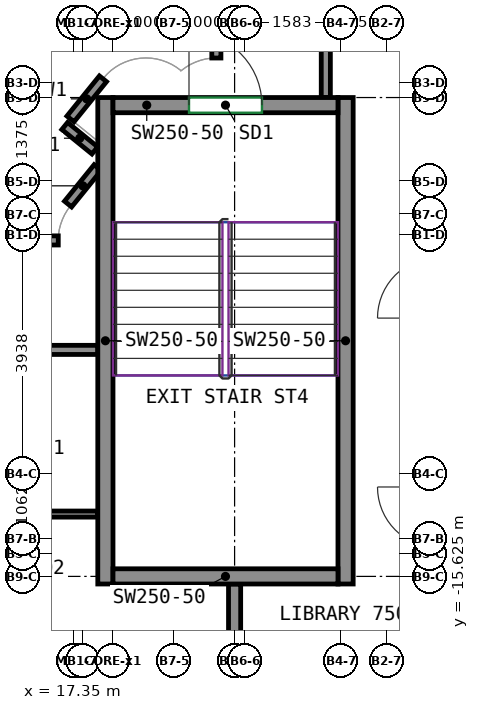
"""IFC4 building model, lengths in metres.
Left out: names, types, materials, properties, quantities, classifications, styles, units other than length and angle.
Written with IfcOpenShell. Run it as: python <this file> out.ifc"""

import sys

from ifc_helpers import new_model, si_unit, direction, frame, frame_2d, origin, place, context, subcontext, project, spatial, rectangle, extrude, source, transform, mapped, element, fill, save


model = new_model("IFC4")
c1 = context("Model", 3, precision=1e-05, world=origin(), true_north=direction((0.0, 1.0)))
c2 = subcontext(c1, "Body", "Model", "MODEL_VIEW")
j1 = project(units=[si_unit("LENGTHUNIT", "METRE"), si_unit("PLANEANGLEUNIT", "RADIAN")], contexts=[c1])
p1 = place(None, origin())
s1 = spatial("IfcSite", under=j1, at=p1, CompositionType="ELEMENT")
p2 = place(p1, origin())
s2 = spatial("IfcBuilding", under=s1, at=p2, CompositionType="ELEMENT")
p3 = place(p2, frame((0.0, 0.0, 301.8)))
s3 = spatial("IfcBuildingStorey", under=s2, at=p3, CompositionType="ELEMENT", Elevation=301.8)
m1 = source(origin(), c2, "Body", "SweptSolid", [
    extrude(rectangle(XDim=8.0, YDim=0.25, at=frame_2d((4.0, 0.0))), origin(), (0.0, 0.0, 1.0), 3.12),
])
for number, where, z_axis, x_axis in (
    (1, (17.875, -15.75, 0.0), (0.0, 0.0, 1.0), (0.0, 1.0, 0.0)),
    (2, (21.825, -15.75, 0.0), (0.0, 0.0, 1.0), (0.0, 1.0, 0.0)),
):
    element("IfcWall", number, at=place(p3, frame(where, z_axis=z_axis, x_axis=x_axis)), inside=s3, PredefinedType="SHEAR", context=c2, shape_type="MappedRepresentation", body=[
        mapped(m1, transform((0.0, 0.0, 0.0))),
    ])
m2 = source(origin(), c2, "Body", "SweptSolid", [
    extrude(rectangle(XDim=3.7, YDim=0.25, at=frame_2d((1.85, 0.0))), origin(), (0.0, 0.0, 1.0), 3.12),
])
p4 = place(p3, frame((18.0, -15.625, 0.0), z_axis=(0.0, 0.0, 1.0), x_axis=(1.0, 0.0, 0.0)))
e3 = element("IfcWall", 3, at=p4, inside=s3, PredefinedType="SHEAR", context=c2, shape_type="MappedRepresentation", body=[
    mapped(m2, transform((0.0, 0.0, 0.0))),
])
p5 = place(p3, frame((18.0, -7.875, 0.0), z_axis=(0.0, 0.0, 1.0), x_axis=(1.0, 0.0, 0.0)))
e4 = element("IfcWall", 4, at=p5, inside=s3, PredefinedType="SHEAR", context=c2, shape_type="MappedRepresentation", body=[
    mapped(m2, transform((0.0, 0.0, 0.0))),
])
p6 = place(p5, frame((1.25, 0.0, 0.0)))
e5 = element("IfcOpeningElement", 5, at=p6, cuts=e4, PredefinedType="OPENING", context=c2, shape_type="SweptSolid", body=[
    extrude(rectangle(XDim=1.2, YDim=2.1, at=frame_2d((0.6, 1.05))), frame((0.0, 0.135, 0.0), z_axis=(0.0, -1.0, 0.0), x_axis=(1.0, 0.0, 0.0)), (0.0, 0.0, 1.0), 0.27),
])
p7 = place(p3, frame((-13.55, -11.9, 0.0), z_axis=(0.0, 0.0, 1.0), x_axis=(1.0, 0.0, 0.0)))
e6 = element("IfcWall", 6, at=p7, inside=s3, PredefinedType="PARTITIONING", context=c2, shape_type="SweptSolid", body=[
    extrude(rectangle(XDim=31.3, YDim=0.15, at=frame_2d((15.65, 0.0))), origin(), (0.0, 0.0, 1.0), 3.12),
])
p8 = place(p7, frame((3.747, 0.0, 0.0)))
e7 = element("IfcOpeningElement", 7, at=p8, cuts=e6, PredefinedType="OPENING", context=c2, shape_type="SweptSolid", body=[
    extrude(rectangle(XDim=1.0, YDim=2.1, at=frame_2d((0.5, 1.05))), frame((0.0, 0.085, 0.0), z_axis=(0.0, -1.0, 0.0), x_axis=(1.0, 0.0, 0.0)), (0.0, 0.0, 1.0), 0.17),
])
p9 = place(p7, frame((22.835, 0.0, 0.0)))
e8 = element("IfcOpeningElement", 8, at=p9, cuts=e6, PredefinedType="OPENING", context=c2, shape_type="SweptSolid", body=[
    extrude(rectangle(XDim=1.0, YDim=2.1, at=frame_2d((0.5, 1.05))), frame((0.0, 0.085, 0.0), z_axis=(0.0, -1.0, 0.0), x_axis=(1.0, 0.0, 0.0)), (0.0, 0.0, 1.0), 0.17),
])
p10 = place(p3, frame((21.5, -7.75, 0.0), z_axis=(0.0, 0.0, 1.0), x_axis=(0.0, 1.0, 0.0)))
e9 = element("IfcWall", 9, at=p10, inside=s3, PredefinedType="PARTITIONING", context=c2, shape_type="SweptSolid", body=[
    extrude(rectangle(XDim=30.575, YDim=0.15, at=frame_2d((15.288, 0.0))), origin(), (0.0, 0.0, 1.0), 3.12),
])
p11 = place(p10, frame((14.035, 0.0, 0.0)))
e10 = element("IfcOpeningElement", 10, at=p11, cuts=e9, PredefinedType="OPENING", context=c2, shape_type="SweptSolid", body=[
    extrude(rectangle(XDim=0.9, YDim=2.1, at=frame_2d((0.45, 1.05))), frame((0.0, 0.085, 0.0), z_axis=(0.0, -1.0, 0.0), x_axis=(1.0, 0.0, 0.0)), (0.0, 0.0, 1.0), 0.17),
])
p12 = place(p3, frame((-13.55, -10.1, 0.0), z_axis=(0.0, 0.0, 1.0), x_axis=(1.0, 0.0, 0.0)))
e11 = element("IfcWall", 11, at=p12, inside=s3, PredefinedType="PARTITIONING", context=c2, shape_type="SweptSolid", body=[
    extrude(rectangle(XDim=30.65, YDim=0.15, at=frame_2d((15.325, 0.0))), origin(), (0.0, 0.0, 1.0), 3.12),
])
p13 = place(p12, frame((10.25, 0.0, 0.0)))
e12 = element("IfcOpeningElement", 12, at=p13, cuts=e11, PredefinedType="OPENING", context=c2, shape_type="SweptSolid", body=[
    extrude(rectangle(XDim=0.9, YDim=2.1, at=frame_2d((0.45, 1.05))), frame((0.0, 0.085, 0.0), z_axis=(0.0, -1.0, 0.0), x_axis=(1.0, 0.0, 0.0)), (0.0, 0.0, 1.0), 0.17),
])
p14 = place(p12, frame((22.153, 0.0, 0.0)))
e13 = element("IfcOpeningElement", 13, at=p14, cuts=e11, PredefinedType="OPENING", context=c2, shape_type="SweptSolid", body=[
    extrude(rectangle(XDim=0.9, YDim=2.1, at=frame_2d((0.45, 1.05))), frame((0.0, 0.085, 0.0), z_axis=(0.0, -1.0, 0.0), x_axis=(1.0, 0.0, 0.0)), (0.0, 0.0, 1.0), 0.17),
])
p15 = place(p3, frame((17.748, -8.902, 0.0), z_axis=(0.0, 0.0, 1.0), x_axis=(-0.630342797145, -0.776316918589, 0.0)))
e14 = element("IfcWall", 14, at=p15, inside=s3, PredefinedType="PARTITIONING", context=c2, shape_type="SweptSolid", body=[
    extrude(rectangle(XDim=0.773, YDim=0.15, at=frame_2d((0.386, 0.0))), origin(), (0.0, 0.0, 1.0), 3.12),
])
p16 = place(p3, frame((17.206, -8.218, 0.0), z_axis=(0.0, 0.0, 1.0), x_axis=(0.776102288291, -0.630607039376, 0.0)))
e15 = element("IfcWall", 15, at=p16, inside=s3, PredefinedType="PARTITIONING", context=c2, shape_type="SweptSolid", body=[
    extrude(rectangle(XDim=0.638, YDim=0.15, at=frame_2d((0.319, 0.0))), origin(), (0.0, 0.0, 1.0), 3.12),
])
p17 = place(p3, frame((17.835, -7.442, 0.0), z_axis=(0.0, 0.0, 1.0), x_axis=(-0.628859024249, -0.777519342281, 0.0)))
e16 = element("IfcWall", 16, at=p17, inside=s3, PredefinedType="PARTITIONING", context=c2, shape_type="SweptSolid", body=[
    extrude(rectangle(XDim=0.849, YDim=0.15, at=frame_2d((0.425, 0.0))), origin(), (0.0, 0.0, 1.0), 3.12),
])
p18 = place(p3, frame((19.7, -7.1, 0.0), z_axis=(0.0, 0.0, 1.0), x_axis=(0.0, 1.0, 0.0)))
e17 = element("IfcWall", 17, at=p18, inside=s3, PredefinedType="PARTITIONING", context=c2, shape_type="SweptSolid", body=[
    extrude(rectangle(XDim=7.135, YDim=0.15, at=frame_2d((3.567, 0.0))), origin(), (0.0, 0.0, 1.0), 3.12),
])
p19 = place(p18, frame((5.633, 0.0, 0.0)))
e18 = element("IfcOpeningElement", 18, at=p19, cuts=e17, PredefinedType="OPENING", context=c2, shape_type="SweptSolid", body=[
    extrude(rectangle(XDim=0.9, YDim=2.1, at=frame_2d((0.45, 1.05))), frame((0.0, 0.085, 0.0), z_axis=(0.0, -1.0, 0.0), x_axis=(1.0, 0.0, 0.0)), (0.0, 0.0, 1.0), 0.17),
])
p20 = place(p3, frame((-13.55, -14.6, 0.0), z_axis=(0.0, 0.0, 1.0), x_axis=(1.0, 0.0, 0.0)))
e19 = element("IfcWall", 19, at=p20, inside=s3, PredefinedType="PARTITIONING", context=c2, shape_type="SweptSolid", body=[
    extrude(rectangle(XDim=31.3, YDim=0.1, at=frame_2d((15.65, 0.0))), origin(), (0.0, 0.0, 1.0), 3.12),
])
p21 = place(p20, frame((0.309, 0.0, 0.0)))
e20 = element("IfcOpeningElement", 20, at=p21, cuts=e19, PredefinedType="OPENING", context=c2, shape_type="SweptSolid", body=[
    extrude(rectangle(XDim=0.9, YDim=2.1, at=frame_2d((0.45, 1.05))), frame((0.0, 0.06, 0.0), z_axis=(0.0, -1.0, 0.0), x_axis=(1.0, 0.0, 0.0)), (0.0, 0.0, 1.0), 0.12),
])
p22 = place(p20, frame((4.103, 0.0, 0.0)))
e21 = element("IfcOpeningElement", 21, at=p22, cuts=e19, PredefinedType="OPENING", context=c2, shape_type="SweptSolid", body=[
    extrude(rectangle(XDim=1.0, YDim=2.1, at=frame_2d((0.5, 1.05))), frame((0.0, 0.06, 0.0), z_axis=(0.0, -1.0, 0.0), x_axis=(1.0, 0.0, 0.0)), (0.0, 0.0, 1.0), 0.12),
])
p23 = place(p20, frame((13.955, 0.0, 0.0)))
e22 = element("IfcOpeningElement", 22, at=p23, cuts=e19, PredefinedType="OPENING", context=c2, shape_type="SweptSolid", body=[
    extrude(rectangle(XDim=0.9, YDim=2.1, at=frame_2d((0.45, 1.05))), frame((0.0, 0.06, 0.0), z_axis=(0.0, -1.0, 0.0), x_axis=(1.0, 0.0, 0.0)), (0.0, 0.0, 1.0), 0.12),
])
p24 = place(p20, frame((17.453, 0.0, 0.0)))
e23 = element("IfcOpeningElement", 23, at=p24, cuts=e19, PredefinedType="OPENING", context=c2, shape_type="SweptSolid", body=[
    extrude(rectangle(XDim=1.0, YDim=2.1, at=frame_2d((0.5, 1.05))), frame((0.0, 0.06, 0.0), z_axis=(0.0, -1.0, 0.0), x_axis=(1.0, 0.0, 0.0)), (0.0, 0.0, 1.0), 0.12),
])
p25 = place(p20, frame((23.13, 0.0, 0.0)))
e24 = element("IfcOpeningElement", 24, at=p25, cuts=e19, PredefinedType="OPENING", context=c2, shape_type="SweptSolid", body=[
    extrude(rectangle(XDim=1.0, YDim=2.1, at=frame_2d((0.5, 1.05))), frame((0.0, 0.06, 0.0), z_axis=(0.0, -1.0, 0.0), x_axis=(1.0, 0.0, 0.0)), (0.0, 0.0, 1.0), 0.12),
])
p26 = place(p3, frame((20.0, -19.9, 0.0), z_axis=(0.0, 0.0, 1.0), x_axis=(0.0, 1.0, 0.0)))
e25 = element("IfcWall", 25, at=p26, inside=s3, PredefinedType="PARTITIONING", context=c2, shape_type="SweptSolid", body=[
    extrude(rectangle(XDim=4.15, YDim=0.2, at=frame_2d((2.075, 0.0))), origin(), (0.0, 0.0, 1.0), 3.12),
])
p27 = place(p6, origin())
e26 = element("IfcDoor", 26, at=p27, inside=s3, OperationType="DOUBLE_DOOR_SINGLE_SWING", PredefinedType="DOOR", context=c2, shape_type="SweptSolid", body=[
    extrude(rectangle(XDim=1.2, YDim=2.1, at=frame_2d((0.6, 1.05))), frame((0.0, 0.025, 0.0), z_axis=(0.0, -1.0, 0.0), x_axis=(1.0, 0.0, 0.0)), (0.0, 0.0, 1.0), 0.05),
])
fill(e5, e26)
save(model, sys.argv[1])
